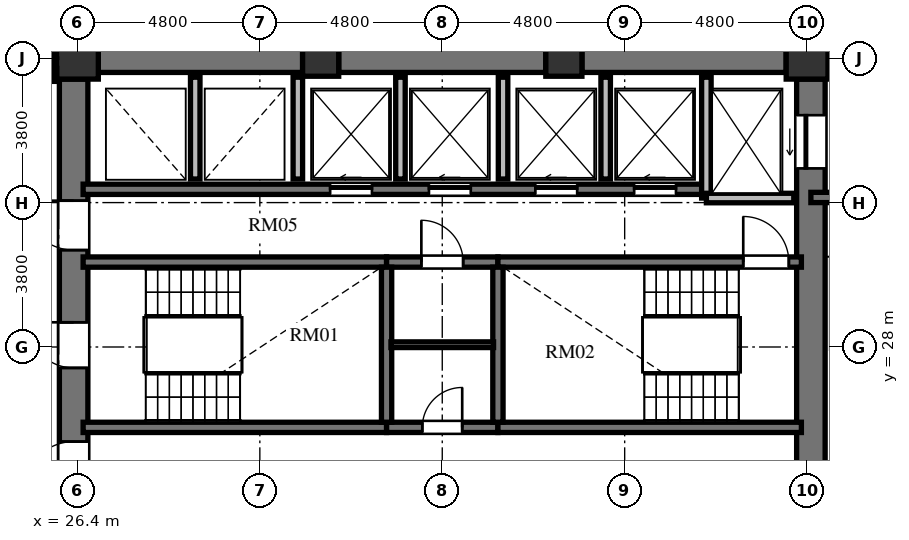
"""IFC4 building model, lengths in metres.
Left out: names, types, materials, properties, quantities, classifications, styles, units other than length and angle.
Written with IfcOpenShell. Run it as: python <this file> out.ifc"""

import sys

from ifc_helpers import new_model, si_unit, direction, frame, frame_2d, origin, origin_2d, place, context, subcontext, project, spatial, rectangle, extrude, element, fill, save


model = new_model("IFC4")
c1 = context("Model", 3, precision=1e-05, world=origin(), true_north=direction((0.0, 1.0)))
c2 = subcontext(c1, "Body", "Model", "MODEL_VIEW")
j1 = project(units=[si_unit("LENGTHUNIT", "METRE"), si_unit("PLANEANGLEUNIT", "RADIAN")], contexts=[c1])
p1 = place(None, origin())
s1 = spatial("IfcSite", under=j1, at=p1, CompositionType="ELEMENT")
p2 = place(p1, origin())
s2 = spatial("IfcBuilding", under=s1, at=p2, CompositionType="ELEMENT")
p3 = place(p2, frame((0.0, 0.0, 132.816)))
s3 = spatial("IfcBuildingStorey", under=s2, at=p3, CompositionType="ELEMENT", Elevation=132.816)
p4 = place(p3, frame((45.6, 35.6, 0.0), z_axis=(0.0, 0.0, 1.0), x_axis=(1.0, 0.0, 0.0)))
e1 = element("IfcColumn", 1, at=p4, inside=s3, PredefinedType="COLUMN", context=c2, shape_type="SweptSolid", body=[
    extrude(rectangle(XDim=1.1, YDim=1.1, at=origin_2d()), origin(), (0.0, 0.0, 1.0), 5.472),
])
for number, where, z_axis, x_axis in (
    (2, (39.2, 35.6, 0.0), (0.0, 0.0, 1.0), (1.0, 0.0, 0.0)),
    (3, (32.8, 35.6, 0.0), (0.0, 0.0, 1.0), (1.0, 0.0, 0.0)),
):
    element("IfcColumn", number, at=place(p3, frame(where, z_axis=z_axis, x_axis=x_axis)), inside=s3, PredefinedType="COLUMN", context=c2, shape_type="SweptSolid", body=[
        extrude(rectangle(XDim=0.95, YDim=0.95, at=origin_2d()), origin(), (0.0, 0.0, 1.0), 5.472),
    ])
p5 = place(p3, frame((26.4, 35.6, 0.0), z_axis=(0.0, 0.0, 1.0), x_axis=(1.0, 0.0, 0.0)))
e4 = element("IfcColumn", 4, at=p5, inside=s3, PredefinedType="COLUMN", context=c2, shape_type="SweptSolid", body=[
    extrude(rectangle(XDim=1.1, YDim=1.1, at=origin_2d()), origin(), (0.0, 0.0, 1.0), 5.472),
])
p6 = place(p3, frame((26.3, 20.95, 0.0), z_axis=(0.0, 0.0, 1.0), x_axis=(0.0, 1.0, 0.0)))
e5 = element("IfcWall", 5, at=p6, inside=s3, PredefinedType="SHEAR", context=c2, shape_type="SweptSolid", body=[
    extrude(rectangle(XDim=14.1, YDim=0.75, at=frame_2d((7.05, 0.0))), origin(), (0.0, 0.0, 1.0), 5.472),
])
p7 = place(p6, frame((6.5, 0.0, 0.0)))
e6 = element("IfcOpeningElement", 6, at=p7, cuts=e5, PredefinedType="OPENING", context=c2, shape_type="SweptSolid", body=[
    extrude(rectangle(XDim=1.2, YDim=2.15, at=frame_2d((0.6, 1.075))), frame((0.0, 0.385, 0.0), z_axis=(0.0, -1.0, 0.0), x_axis=(1.0, 0.0, 0.0)), (0.0, 0.0, 1.0), 0.77),
])
p8 = place(p6, frame((9.6, 0.0, 0.0)))
e7 = element("IfcOpeningElement", 7, at=p8, cuts=e5, PredefinedType="OPENING", context=c2, shape_type="SweptSolid", body=[
    extrude(rectangle(XDim=1.3, YDim=2.2, at=frame_2d((0.65, 1.1))), frame((0.0, 0.385, 0.0), z_axis=(0.0, -1.0, 0.0), x_axis=(1.0, 0.0, 0.0)), (0.0, 0.0, 1.0), 0.77),
])
p9 = place(p6, frame((3.26, 0.0, 0.0)))
e8 = element("IfcOpeningElement", 8, at=p9, cuts=e5, PredefinedType="OPENING", context=c2, shape_type="SweptSolid", body=[
    extrude(rectangle(XDim=1.3, YDim=2.2, at=frame_2d((0.65, 1.1))), frame((0.0, 0.385, 0.0), z_axis=(0.0, -1.0, 0.0), x_axis=(1.0, 0.0, 0.0)), (0.0, 0.0, 1.0), 0.77),
])
p10 = place(p3, frame((45.7, 20.95, 0.0), z_axis=(0.0, 0.0, 1.0), x_axis=(0.0, 1.0, 0.0)))
e9 = element("IfcWall", 9, at=p10, inside=s3, PredefinedType="SHEAR", context=c2, shape_type="SweptSolid", body=[
    extrude(rectangle(XDim=14.1, YDim=0.75, at=frame_2d((7.05, 0.0))), origin(), (0.0, 0.0, 1.0), 5.472),
])
p11 = place(p10, frame((11.75, 0.0, 0.0)))
e10 = element("IfcOpeningElement", 10, at=p11, cuts=e9, PredefinedType="OPENING", context=c2, shape_type="SweptSolid", body=[
    extrude(rectangle(XDim=1.4, YDim=2.3, at=frame_2d((0.7, 1.15))), frame((0.0, 0.385, 0.0), z_axis=(0.0, -1.0, 0.0), x_axis=(1.0, 0.0, 0.0)), (0.0, 0.0, 1.0), 0.77),
])
p12 = place(p10, frame((0.95, 0.0, 0.0)))
e11 = element("IfcOpeningElement", 11, at=p12, cuts=e9, PredefinedType="OPENING", context=c2, shape_type="SweptSolid", body=[
    extrude(rectangle(XDim=1.4, YDim=2.3, at=frame_2d((0.7, 1.15))), frame((0.0, 0.385, 0.0), z_axis=(0.0, -1.0, 0.0), x_axis=(1.0, 0.0, 0.0)), (0.0, 0.0, 1.0), 0.77),
])
p13 = place(p3, frame((26.95, 35.6, 0.0), z_axis=(0.0, 0.0, 1.0), x_axis=(1.0, 0.0, 0.0)))
e12 = element("IfcWall", 12, at=p13, inside=s3, PredefinedType="SHEAR", context=c2, shape_type="SweptSolid", body=[
    extrude(rectangle(XDim=5.375, YDim=0.75, at=frame_2d((2.688, 0.0))), origin(), (0.0, 0.0, 1.0), 5.472),
])
p14 = place(p3, frame((33.275, 35.6, 0.0), z_axis=(0.0, 0.0, 1.0), x_axis=(1.0, 0.0, 0.0)))
e13 = element("IfcWall", 13, at=p14, inside=s3, PredefinedType="SHEAR", context=c2, shape_type="SweptSolid", body=[
    extrude(rectangle(XDim=5.45, YDim=0.75, at=frame_2d((2.725, 0.0))), origin(), (0.0, 0.0, 1.0), 5.472),
])
p15 = place(p3, frame((39.675, 35.6, 0.0), z_axis=(0.0, 0.0, 1.0), x_axis=(1.0, 0.0, 0.0)))
e14 = element("IfcWall", 14, at=p15, inside=s3, PredefinedType="SHEAR", context=c2, shape_type="SweptSolid", body=[
    extrude(rectangle(XDim=5.375, YDim=0.75, at=frame_2d((2.688, 0.0))), origin(), (0.0, 0.0, 1.0), 5.472),
])
p16 = place(p3, frame((26.55, 30.235, 0.0), z_axis=(0.0, 0.0, 1.0), x_axis=(1.0, 0.0, 0.0)))
e15 = element("IfcWall", 15, at=p16, inside=s3, PredefinedType="SHEAR", context=c2, shape_type="SweptSolid", body=[
    extrude(rectangle(XDim=7.985, YDim=0.27, at=frame_2d((3.992, 0.0))), origin(), (0.0, 0.0, 1.0), 5.472),
])
p17 = place(p3, frame((34.535, 30.235, 0.0), z_axis=(0.0, 0.0, 1.0), x_axis=(1.0, 0.0, 0.0)))
e16 = element("IfcWall", 16, at=p17, inside=s3, PredefinedType="SHEAR", context=c2, shape_type="SweptSolid", body=[
    extrude(rectangle(XDim=2.93, YDim=0.27, at=frame_2d((1.465, 0.0))), origin(), (0.0, 0.0, 1.0), 5.472),
])
p18 = place(p17, frame((0.915, 0.0, 0.0)))
e17 = element("IfcOpeningElement", 17, at=p18, cuts=e16, PredefinedType="OPENING", context=c2, shape_type="SweptSolid", body=[
    extrude(rectangle(XDim=1.1, YDim=2.15, at=frame_2d((0.55, 1.075))), frame((0.0, 0.145, 0.0), z_axis=(0.0, -1.0, 0.0), x_axis=(1.0, 0.0, 0.0)), (0.0, 0.0, 1.0), 0.29),
])
p19 = place(p3, frame((37.465, 30.235, 0.0), z_axis=(0.0, 0.0, 1.0), x_axis=(1.0, 0.0, 0.0)))
e18 = element("IfcWall", 18, at=p19, inside=s3, PredefinedType="SHEAR", context=c2, shape_type="SweptSolid", body=[
    extrude(rectangle(XDim=7.985, YDim=0.27, at=frame_2d((3.992, 0.0))), origin(), (0.0, 0.0, 1.0), 5.472),
])
p20 = place(p19, frame((6.455, 0.0, 0.0)))
e19 = element("IfcOpeningElement", 19, at=p20, cuts=e18, PredefinedType="OPENING", context=c2, shape_type="SweptSolid", body=[
    extrude(rectangle(XDim=1.2, YDim=2.15, at=frame_2d((0.6, 1.075))), frame((0.0, 0.145, 0.0), z_axis=(0.0, -1.0, 0.0), x_axis=(1.0, 0.0, 0.0)), (0.0, 0.0, 1.0), 0.29),
])
p21 = place(p3, frame((26.55, 25.885, 0.0), z_axis=(0.0, 0.0, 1.0), x_axis=(1.0, 0.0, 0.0)))
e20 = element("IfcWall", 20, at=p21, inside=s3, PredefinedType="SHEAR", context=c2, shape_type="SweptSolid", body=[
    extrude(rectangle(XDim=7.985, YDim=0.27, at=frame_2d((3.992, 0.0))), origin(), (0.0, 0.0, 1.0), 5.472),
])
p22 = place(p3, frame((34.535, 25.885, 0.0), z_axis=(0.0, 0.0, 1.0), x_axis=(1.0, 0.0, 0.0)))
e21 = element("IfcWall", 21, at=p22, inside=s3, PredefinedType="SHEAR", context=c2, shape_type="SweptSolid", body=[
    extrude(rectangle(XDim=2.93, YDim=0.27, at=frame_2d((1.465, 0.0))), origin(), (0.0, 0.0, 1.0), 5.472),
])
p23 = place(p22, frame((0.94, 0.0, 0.0)))
e22 = element("IfcOpeningElement", 22, at=p23, cuts=e21, PredefinedType="OPENING", context=c2, shape_type="SweptSolid", body=[
    extrude(rectangle(XDim=1.05, YDim=2.15, at=frame_2d((0.525, 1.075))), frame((0.0, 0.145, 0.0), z_axis=(0.0, -1.0, 0.0), x_axis=(1.0, 0.0, 0.0)), (0.0, 0.0, 1.0), 0.29),
])
p24 = place(p3, frame((37.465, 25.885, 0.0), z_axis=(0.0, 0.0, 1.0), x_axis=(1.0, 0.0, 0.0)))
e23 = element("IfcWall", 23, at=p24, inside=s3, PredefinedType="SHEAR", context=c2, shape_type="SweptSolid", body=[
    extrude(rectangle(XDim=7.985, YDim=0.27, at=frame_2d((3.992, 0.0))), origin(), (0.0, 0.0, 1.0), 5.472),
])
for number, where, z_axis, x_axis in (
    (24, (34.535, 26.02, 0.0), (0.0, 0.0, 1.0), (0.0, 1.0, 0.0)),
    (25, (37.465, 26.02, 0.0), (0.0, 0.0, 1.0), (0.0, 1.0, 0.0)),
):
    element("IfcWall", number, at=place(p3, frame(where, z_axis=z_axis, x_axis=x_axis)), inside=s3, PredefinedType="SHEAR", context=c2, shape_type="SweptSolid", body=[
        extrude(rectangle(XDim=4.08, YDim=0.27, at=frame_2d((2.04, 0.0))), origin(), (0.0, 0.0, 1.0), 5.472),
    ])
p25 = place(p3, frame((34.65, 28.06, 0.0), z_axis=(0.0, 0.0, 1.0), x_axis=(1.0, 0.0, 0.0)))
e26 = element("IfcWall", 26, at=p25, inside=s3, PredefinedType="PARTITIONING", context=c2, shape_type="SweptSolid", body=[
    extrude(rectangle(XDim=2.7, YDim=0.15, at=frame_2d((1.35, 0.0))), origin(), (0.0, 0.0, 1.0), 5.022),
])
p26 = place(p3, frame((26.55, 32.15, 0.0), z_axis=(0.0, 0.0, 1.0), x_axis=(1.0, 0.0, 0.0)))
e27 = element("IfcWall", 27, at=p26, inside=s3, PredefinedType="SHEAR", context=c2, shape_type="SweptSolid", body=[
    extrude(rectangle(XDim=16.4, YDim=0.27, at=frame_2d((8.2, 0.0))), origin(), (0.0, 0.0, 1.0), 5.472),
])
p27 = place(p26, frame((6.5, 0.0, 0.0)))
e28 = element("IfcOpeningElement", 28, at=p27, cuts=e27, PredefinedType="OPENING", context=c2, shape_type="SweptSolid", body=[
    extrude(rectangle(XDim=1.1, YDim=2.2, at=frame_2d((0.55, 1.1))), frame((0.0, 0.145, 0.0), z_axis=(0.0, -1.0, 0.0), x_axis=(1.0, 0.0, 0.0)), (0.0, 0.0, 1.0), 0.29),
])
p28 = place(p26, frame((9.1, 0.0, 0.0)))
e29 = element("IfcOpeningElement", 29, at=p28, cuts=e27, PredefinedType="OPENING", context=c2, shape_type="SweptSolid", body=[
    extrude(rectangle(XDim=1.1, YDim=2.2, at=frame_2d((0.55, 1.1))), frame((0.0, 0.145, 0.0), z_axis=(0.0, -1.0, 0.0), x_axis=(1.0, 0.0, 0.0)), (0.0, 0.0, 1.0), 0.29),
])
p29 = place(p26, frame((11.9, 0.0, 0.0)))
e30 = element("IfcOpeningElement", 30, at=p29, cuts=e27, PredefinedType="OPENING", context=c2, shape_type="SweptSolid", body=[
    extrude(rectangle(XDim=1.1, YDim=2.2, at=frame_2d((0.55, 1.1))), frame((0.0, 0.145, 0.0), z_axis=(0.0, -1.0, 0.0), x_axis=(1.0, 0.0, 0.0)), (0.0, 0.0, 1.0), 0.29),
])
p30 = place(p26, frame((14.5, 0.0, 0.0)))
e31 = element("IfcOpeningElement", 31, at=p30, cuts=e27, PredefinedType="OPENING", context=c2, shape_type="SweptSolid", body=[
    extrude(rectangle(XDim=1.1, YDim=2.2, at=frame_2d((0.55, 1.1))), frame((0.0, 0.145, 0.0), z_axis=(0.0, -1.0, 0.0), x_axis=(1.0, 0.0, 0.0)), (0.0, 0.0, 1.0), 0.29),
])
p31 = place(p3, frame((42.95, 31.92, 0.0), z_axis=(0.0, 0.0, 1.0), x_axis=(0.0, 1.0, 0.0)))
e32 = element("IfcWall", 32, at=p31, inside=s3, PredefinedType="SOLIDWALL", context=c2, shape_type="SweptSolid", body=[
    extrude(rectangle(XDim=3.18, YDim=0.25, at=frame_2d((1.59, 0.0))), origin(), (0.0, 0.0, 1.0), 5.022),
])
p32 = place(p3, frame((42.95, 31.92, 0.0), z_axis=(0.0, 0.0, 1.0), x_axis=(1.0, 0.0, 0.0)))
e33 = element("IfcWall", 33, at=p32, inside=s3, PredefinedType="SOLIDWALL", context=c2, shape_type="SweptSolid", body=[
    extrude(rectangle(XDim=2.3, YDim=0.25, at=frame_2d((1.15, 0.0))), origin(), (0.0, 0.0, 1.0), 5.022),
])
for number, where, z_axis, x_axis in (
    (34, (29.5, 32.42, 0.0), (0.0, 0.0, 1.0), (0.0, 1.0, 0.0)),
    (35, (32.2, 32.42, 0.0), (0.0, 0.0, 1.0), (0.0, 1.0, 0.0)),
    (36, (34.9, 32.42, 0.0), (0.0, 0.0, 1.0), (0.0, 1.0, 0.0)),
    (37, (37.6, 32.42, 0.0), (0.0, 0.0, 1.0), (0.0, 1.0, 0.0)),
    (38, (40.3, 32.42, 0.0), (0.0, 0.0, 1.0), (0.0, 1.0, 0.0)),
):
    element("IfcWall", number, at=place(p3, frame(where, z_axis=z_axis, x_axis=x_axis)), inside=s3, PredefinedType="SOLIDWALL", context=c2, shape_type="SweptSolid", body=[
        extrude(rectangle(XDim=2.68, YDim=0.25, at=frame_2d((1.34, 0.0))), origin(), (0.0, 0.0, 1.0), 5.022),
    ])
p33 = place(p3, frame((45.7, 31.935, 0.0), z_axis=(0.0, 0.0, 1.0), x_axis=(1.0, 0.0, 0.0)))
e39 = element("IfcWall", 39, at=p33, inside=s3, PredefinedType="SHEAR", context=c2, shape_type="SweptSolid", body=[
    extrude(rectangle(XDim=4.715, YDim=0.27, at=frame_2d((2.357, 0.0))), origin(), (0.0, 0.0, 1.0), 5.472),
])
p34 = place(p3, frame((25.83, 36.21, 0.0), z_axis=(0.0, 0.0, 1.0), x_axis=(0.0, -1.0, 0.0)))
e40 = element("IfcWall", 40, at=p34, inside=s3, PredefinedType="PARTITIONING", context=c2, shape_type="SweptSolid", body=[
    extrude(rectangle(XDim=1.22, YDim=0.18, at=frame_2d((0.61, 0.0))), origin(), (0.0, 0.0, 1.0), 5.022),
])
p35 = place(p7, origin())
e41 = element("IfcDoor", 41, at=p35, inside=s3, OperationType="SINGLE_SWING_RIGHT", PredefinedType="DOOR", context=c2, shape_type="SweptSolid", body=[
    extrude(rectangle(XDim=1.2, YDim=2.15, at=frame_2d((0.6, 1.075))), frame((0.0, 0.025, 0.0), z_axis=(0.0, -1.0, 0.0), x_axis=(1.0, 0.0, 0.0)), (0.0, 0.0, 1.0), 0.05),
])
fill(e6, e41)
p36 = place(p20, origin())
e42 = element("IfcDoor", 42, at=p36, inside=s3, OperationType="SINGLE_SWING_LEFT", PredefinedType="DOOR", context=c2, shape_type="SweptSolid", body=[
    extrude(rectangle(XDim=1.2, YDim=2.15, at=frame_2d((0.6, 1.075))), frame((0.0, 0.025, 0.0), z_axis=(0.0, -1.0, 0.0), x_axis=(1.0, 0.0, 0.0)), (0.0, 0.0, 1.0), 0.05),
])
fill(e19, e42)
p37 = place(p23, origin())
e43 = element("IfcDoor", 43, at=p37, inside=s3, OperationType="SINGLE_SWING_RIGHT", PredefinedType="DOOR", context=c2, shape_type="SweptSolid", body=[
    extrude(rectangle(XDim=1.05, YDim=2.15, at=frame_2d((0.525, 1.075))), frame((0.0, 0.025, 0.0), z_axis=(0.0, -1.0, 0.0), x_axis=(1.0, 0.0, 0.0)), (0.0, 0.0, 1.0), 0.05),
])
fill(e22, e43)
p38 = place(p18, origin())
e44 = element("IfcDoor", 44, at=p38, inside=s3, OperationType="SINGLE_SWING_LEFT", PredefinedType="DOOR", context=c2, shape_type="SweptSolid", body=[
    extrude(rectangle(XDim=1.1, YDim=2.15, at=frame_2d((0.55, 1.075))), frame((0.0, 0.025, 0.0), z_axis=(0.0, -1.0, 0.0), x_axis=(1.0, 0.0, 0.0)), (0.0, 0.0, 1.0), 0.05),
])
fill(e17, e44)
p39 = place(p8, origin())
e45 = element("IfcDoor", 45, at=p39, inside=s3, OperationType="SINGLE_SWING_RIGHT", PredefinedType="DOOR", context=c2, shape_type="SweptSolid", body=[
    extrude(rectangle(XDim=1.3, YDim=2.2, at=frame_2d((0.65, 1.1))), frame((0.0, 0.025, 0.0), z_axis=(0.0, -1.0, 0.0), x_axis=(1.0, 0.0, 0.0)), (0.0, 0.0, 1.0), 0.05),
])
fill(e7, e45)
p40 = place(p9, origin())
e46 = element("IfcDoor", 46, at=p40, inside=s3, OperationType="SINGLE_SWING_LEFT", PredefinedType="DOOR", context=c2, shape_type="SweptSolid", body=[
    extrude(rectangle(XDim=1.3, YDim=2.2, at=frame_2d((0.65, 1.1))), frame((0.0, 0.025, 0.0), z_axis=(0.0, -1.0, 0.0), x_axis=(1.0, 0.0, 0.0)), (0.0, 0.0, 1.0), 0.05),
])
fill(e8, e46)
p41 = place(p27, origin())
e47 = element("IfcDoor", 47, at=p41, inside=s3, OperationType="SLIDING_TO_LEFT", PredefinedType="DOOR", context=c2, shape_type="SweptSolid", body=[
    extrude(rectangle(XDim=1.1, YDim=2.2, at=frame_2d((0.55, 1.1))), frame((0.0, 0.025, 0.0), z_axis=(0.0, -1.0, 0.0), x_axis=(1.0, 0.0, 0.0)), (0.0, 0.0, 1.0), 0.05),
])
fill(e28, e47)
p42 = place(p28, origin())
e48 = element("IfcDoor", 48, at=p42, inside=s3, OperationType="SLIDING_TO_LEFT", PredefinedType="DOOR", context=c2, shape_type="SweptSolid", body=[
    extrude(rectangle(XDim=1.1, YDim=2.2, at=frame_2d((0.55, 1.1))), frame((0.0, 0.025, 0.0), z_axis=(0.0, -1.0, 0.0), x_axis=(1.0, 0.0, 0.0)), (0.0, 0.0, 1.0), 0.05),
])
fill(e29, e48)
p43 = place(p29, origin())
e49 = element("IfcDoor", 49, at=p43, inside=s3, OperationType="SLIDING_TO_LEFT", PredefinedType="DOOR", context=c2, shape_type="SweptSolid", body=[
    extrude(rectangle(XDim=1.1, YDim=2.2, at=frame_2d((0.55, 1.1))), frame((0.0, 0.025, 0.0), z_axis=(0.0, -1.0, 0.0), x_axis=(1.0, 0.0, 0.0)), (0.0, 0.0, 1.0), 0.05),
])
fill(e30, e49)
p44 = place(p30, origin())
e50 = element("IfcDoor", 50, at=p44, inside=s3, OperationType="SLIDING_TO_LEFT", PredefinedType="DOOR", context=c2, shape_type="SweptSolid", body=[
    extrude(rectangle(XDim=1.1, YDim=2.2, at=frame_2d((0.55, 1.1))), frame((0.0, 0.025, 0.0), z_axis=(0.0, -1.0, 0.0), x_axis=(1.0, 0.0, 0.0)), (0.0, 0.0, 1.0), 0.05),
])
fill(e31, e50)
p45 = place(p11, origin())
e51 = element("IfcDoor", 51, at=p45, inside=s3, OperationType="SLIDING_TO_LEFT", PredefinedType="DOOR", context=c2, shape_type="SweptSolid", body=[
    extrude(rectangle(XDim=1.4, YDim=2.3, at=frame_2d((0.7, 1.15))), frame((0.0, 0.025, 0.0), z_axis=(0.0, -1.0, 0.0), x_axis=(1.0, 0.0, 0.0)), (0.0, 0.0, 1.0), 0.05),
])
fill(e10, e51)
save(model, sys.argv[1])
